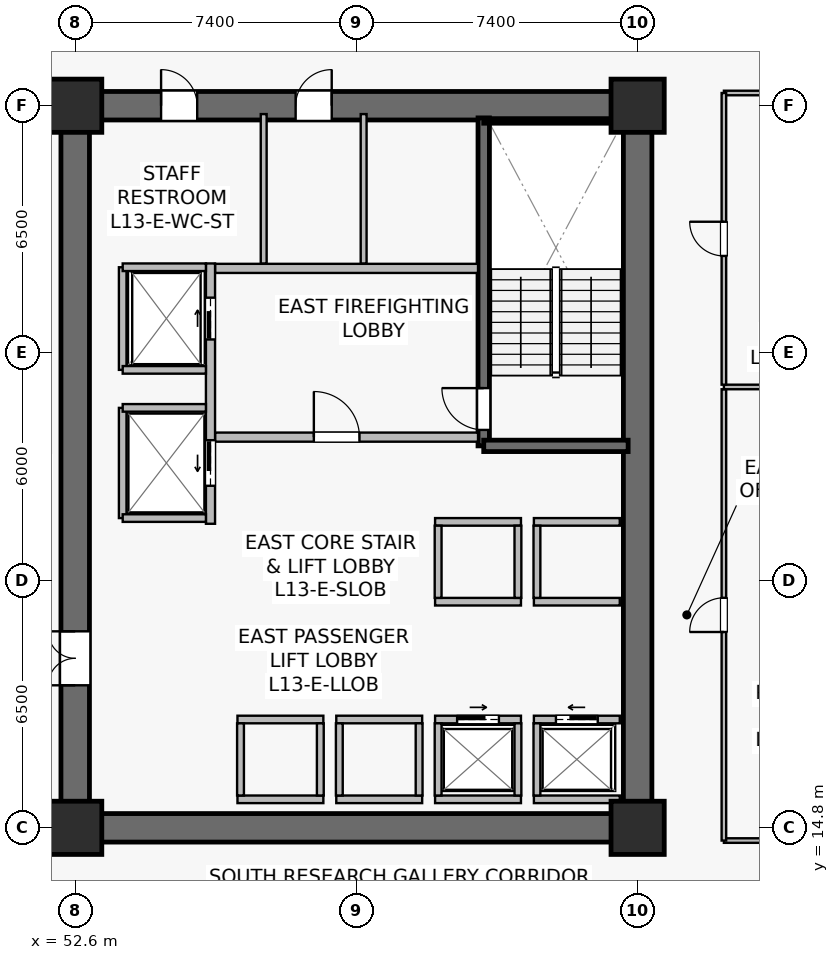
"""IFC4 building model, lengths in metres.
Left out: names, types, materials, properties, quantities, classifications, styles, units other than length and angle.
Written with IfcOpenShell. Run it as: python <this file> out.ifc"""

import sys

from ifc_helpers import new_model, si_unit, direction, frame, frame_2d, origin, origin_2d, place, context, subcontext, project, spatial, rectangle, extrude, source, transform, mapped, element, fill, save


model = new_model("IFC4")
c1 = context("Model", 3, precision=1e-05, world=origin(), true_north=direction((0.0, 1.0)))
c2 = subcontext(c1, "Body", "Model", "MODEL_VIEW")
j1 = project(units=[si_unit("LENGTHUNIT", "METRE"), si_unit("PLANEANGLEUNIT", "RADIAN")], contexts=[c1])
p1 = place(None, origin())
s1 = spatial("IfcSite", under=j1, at=p1, CompositionType="ELEMENT")
p2 = place(p1, origin())
s2 = spatial("IfcBuilding", under=s1, at=p2, CompositionType="ELEMENT")
p3 = place(p2, frame((0.0, 0.0, 53.9)))
s3 = spatial("IfcBuildingStorey", under=s2, at=p3, CompositionType="ELEMENT", Elevation=53.9)
p4 = place(p3, frame((52.225, 14.8, 0.0), z_axis=(0.0, 0.0, 1.0), x_axis=(1.0, 0.0, 0.0)))
e1 = element("IfcWall", 1, at=p4, inside=s3, PredefinedType="SHEAR", context=c2, shape_type="SweptSolid", body=[
    extrude(rectangle(XDim=15.55, YDim=0.75, at=frame_2d((7.775, 0.0))), origin(), (0.0, 0.0, 1.0), 3.78),
])
p5 = place(p3, frame((52.225, 33.8, 0.0), z_axis=(0.0, 0.0, 1.0), x_axis=(1.0, 0.0, 0.0)))
e2 = element("IfcWall", 2, at=p5, inside=s3, PredefinedType="SHEAR", context=c2, shape_type="SweptSolid", body=[
    extrude(rectangle(XDim=15.55, YDim=0.75, at=frame_2d((7.775, 0.0))), origin(), (0.0, 0.0, 1.0), 3.78),
])
p6 = place(p5, frame((6.175, 0.0, 0.0)))
e3 = element("IfcOpeningElement", 3, at=p6, cuts=e2, PredefinedType="OPENING", context=c2, shape_type="SweptSolid", body=[
    extrude(rectangle(XDim=0.95, YDim=2.15, at=frame_2d((0.475, 1.075))), frame((0.0, 0.385, 0.0), z_axis=(0.0, -1.0, 0.0), x_axis=(1.0, 0.0, 0.0)), (0.0, 0.0, 1.0), 0.77),
])
p7 = place(p5, frame((2.635, 0.0, 0.0)))
e4 = element("IfcOpeningElement", 4, at=p7, cuts=e2, PredefinedType="OPENING", context=c2, shape_type="SweptSolid", body=[
    extrude(rectangle(XDim=0.95, YDim=2.15, at=frame_2d((0.475, 1.075))), frame((0.0, 0.385, 0.0), z_axis=(0.0, -1.0, 0.0), x_axis=(1.0, 0.0, 0.0)), (0.0, 0.0, 1.0), 0.77),
])
p8 = place(p3, frame((52.6, 15.175, 0.0), z_axis=(0.0, 0.0, 1.0), x_axis=(0.0, 1.0, 0.0)))
e5 = element("IfcWall", 5, at=p8, inside=s3, PredefinedType="SHEAR", context=c2, shape_type="SweptSolid", body=[
    extrude(rectangle(XDim=18.25, YDim=0.75, at=frame_2d((9.125, 0.0))), origin(), (0.0, 0.0, 1.0), 3.78),
])
p9 = place(p8, frame((3.375, 0.0, 0.0)))
e6 = element("IfcOpeningElement", 6, at=p9, cuts=e5, PredefinedType="OPENING", context=c2, shape_type="SweptSolid", body=[
    extrude(rectangle(XDim=1.42, YDim=2.2, at=frame_2d((0.71, 1.1))), frame((0.0, 0.385, 0.0), z_axis=(0.0, -1.0, 0.0), x_axis=(1.0, 0.0, 0.0)), (0.0, 0.0, 1.0), 0.77),
])
p10 = place(p3, frame((67.4, 15.175, 0.0), z_axis=(0.0, 0.0, 1.0), x_axis=(0.0, 1.0, 0.0)))
e7 = element("IfcWall", 7, at=p10, inside=s3, PredefinedType="SHEAR", context=c2, shape_type="SweptSolid", body=[
    extrude(rectangle(XDim=18.25, YDim=0.75, at=frame_2d((9.125, 0.0))), origin(), (0.0, 0.0, 1.0), 3.78),
])
p11 = place(p3, frame((63.35, 24.85, 0.0), z_axis=(0.0, 0.0, 1.0), x_axis=(0.0, 1.0, 0.0)))
e8 = element("IfcWall", 8, at=p11, inside=s3, PredefinedType="SHEAR", context=c2, shape_type="SweptSolid", body=[
    extrude(rectangle(XDim=8.63, YDim=0.3, at=frame_2d((4.315, 0.0))), origin(), (0.0, 0.0, 1.0), 3.78),
])
p12 = place(p11, frame((0.42, 0.0, 0.0)))
e9 = element("IfcOpeningElement", 9, at=p12, cuts=e8, PredefinedType="OPENING", context=c2, shape_type="SweptSolid", body=[
    extrude(rectangle(XDim=1.1, YDim=2.15, at=frame_2d((0.55, 1.075))), frame((0.0, 0.16, 0.0), z_axis=(0.0, -1.0, 0.0), x_axis=(1.0, 0.0, 0.0)), (0.0, 0.0, 1.0), 0.32),
])
p13 = place(p3, frame((63.35, 24.85, 0.0), z_axis=(0.0, 0.0, 1.0), x_axis=(1.0, 0.0, 0.0)))
e10 = element("IfcWall", 10, at=p13, inside=s3, PredefinedType="SHEAR", context=c2, shape_type="SweptSolid", body=[
    extrude(rectangle(XDim=3.8, YDim=0.3, at=frame_2d((1.9, 0.0))), origin(), (0.0, 0.0, 1.0), 3.78),
])
p14 = place(p3, frame((63.35, 33.4, 0.0), z_axis=(0.0, 0.0, 1.0), x_axis=(1.0, 0.0, 0.0)))
e11 = element("IfcWall", 11, at=p14, inside=s3, PredefinedType="SOLIDWALL", context=c2, shape_type="SweptSolid", body=[
    extrude(rectangle(XDim=3.72, YDim=0.12, at=frame_2d((1.86, 0.0))), origin(), (0.0, 0.0, 1.0), 3.78),
])
m1 = source(origin(), c2, "Body", "SweptSolid", [
    extrude(rectangle(XDim=1.4, YDim=1.4, at=origin_2d()), origin(), (0.0, 0.0, 1.0), 4.1),
])
for number, where, z_axis, x_axis in (
    (12, (52.6, 14.8, 0.0), (0.0, 0.0, 1.0), (1.0, 0.0, 0.0)),
    (13, (67.4, 14.8, 0.0), (0.0, 0.0, 1.0), (1.0, 0.0, 0.0)),
    (14, (52.6, 33.8, 0.0), (0.0, 0.0, 1.0), (1.0, 0.0, 0.0)),
    (15, (67.4, 33.8, 0.0), (0.0, 0.0, 1.0), (1.0, 0.0, 0.0)),
):
    element("IfcColumn", number, at=place(p3, frame(where, z_axis=z_axis, x_axis=x_axis)), inside=s3, PredefinedType="COLUMN", context=c2, shape_type="MappedRepresentation", body=[
        mapped(m1, transform((0.0, 0.0, 0.0), scale=1.0)),
    ])
p15 = place(p3, frame((56.28, 25.08, 0.0), z_axis=(0.0, 0.0, 1.0), x_axis=(1.0, 0.0, 0.0)))
e16 = element("IfcWall", 16, at=p15, inside=s3, PredefinedType="SOLIDWALL", context=c2, shape_type="SweptSolid", body=[
    extrude(rectangle(XDim=6.92, YDim=0.24, at=frame_2d((3.46, 0.0))), origin(), (0.0, 0.0, 1.0), 3.065),
])
p16 = place(p15, frame((2.6, 0.0, 0.0)))
e17 = element("IfcOpeningElement", 17, at=p16, cuts=e16, PredefinedType="OPENING", context=c2, shape_type="SweptSolid", body=[
    extrude(rectangle(XDim=1.2, YDim=2.16, at=frame_2d((0.6, 1.08))), frame((0.0, 0.13, 0.0), z_axis=(0.0, -1.0, 0.0), x_axis=(1.0, 0.0, 0.0)), (0.0, 0.0, 1.0), 0.26),
])
p17 = place(p3, frame((56.28, 29.52, 0.0), z_axis=(0.0, 0.0, 1.0), x_axis=(1.0, 0.0, 0.0)))
e18 = element("IfcWall", 18, at=p17, inside=s3, PredefinedType="SOLIDWALL", context=c2, shape_type="SweptSolid", body=[
    extrude(rectangle(XDim=6.92, YDim=0.24, at=frame_2d((3.46, 0.0))), origin(), (0.0, 0.0, 1.0), 3.065),
])
p18 = place(p3, frame((56.16, 22.8, 0.0), z_axis=(0.0, 0.0, 1.0), x_axis=(0.0, 1.0, 0.0)))
e19 = element("IfcWall", 19, at=p18, inside=s3, PredefinedType="SOLIDWALL", context=c2, shape_type="SweptSolid", body=[
    extrude(rectangle(XDim=6.85, YDim=0.24, at=frame_2d((3.425, 0.0))), origin(), (0.0, 0.0, 1.0), 2.865),
])
p19 = place(p18, frame((4.85, 0.0, 0.0)))
e20 = element("IfcOpeningElement", 20, at=p19, cuts=e19, PredefinedType="OPENING", context=c2, shape_type="SweptSolid", body=[
    extrude(rectangle(XDim=1.1, YDim=2.22, at=frame_2d((0.55, 1.11))), frame((0.0, 0.13, 0.0), z_axis=(0.0, -1.0, 0.0), x_axis=(1.0, 0.0, 0.0)), (0.0, 0.0, 1.0), 0.26),
])
p20 = place(p18, frame((1.0, 0.0, 0.0)))
e21 = element("IfcOpeningElement", 21, at=p20, cuts=e19, PredefinedType="OPENING", context=c2, shape_type="SweptSolid", body=[
    extrude(rectangle(XDim=1.2, YDim=2.22, at=frame_2d((0.6, 1.11))), frame((0.0, 0.13, 0.0), z_axis=(0.0, -1.0, 0.0), x_axis=(1.0, 0.0, 0.0)), (0.0, 0.0, 1.0), 0.26),
])
p21 = place(p3, frame((64.67, 17.65, 0.0), z_axis=(0.0, 0.0, 1.0), x_axis=(1.0, 0.0, 0.0)))
e22 = element("IfcWall", 22, at=p21, inside=s3, PredefinedType="SOLIDWALL", context=c2, shape_type="SweptSolid", body=[
    extrude(rectangle(XDim=2.26, YDim=0.2, at=frame_2d((1.13, 0.0))), origin(), (0.0, 0.0, 1.0), 3.78),
])
p22 = place(p21, frame((0.58, 0.0, 0.0)))
e23 = element("IfcOpeningElement", 23, at=p22, cuts=e22, PredefinedType="OPENING", context=c2, shape_type="SweptSolid", body=[
    extrude(rectangle(XDim=1.1, YDim=2.22, at=frame_2d((0.55, 1.11))), frame((0.0, 0.11, 0.0), z_axis=(0.0, -1.0, 0.0), x_axis=(1.0, 0.0, 0.0)), (0.0, 0.0, 1.0), 0.22),
])
p23 = place(p3, frame((64.67, 15.55, 0.0), z_axis=(0.0, 0.0, 1.0), x_axis=(1.0, 0.0, 0.0)))
e24 = element("IfcWall", 24, at=p23, inside=s3, PredefinedType="SOLIDWALL", context=c2, shape_type="SweptSolid", body=[
    extrude(rectangle(XDim=2.26, YDim=0.2, at=frame_2d((1.13, 0.0))), origin(), (0.0, 0.0, 1.0), 3.78),
])
p24 = place(p3, frame((64.75, 15.65, 0.0), z_axis=(0.0, 0.0, 1.0), x_axis=(0.0, 1.0, 0.0)))
e25 = element("IfcWall", 25, at=p24, inside=s3, PredefinedType="SOLIDWALL", context=c2, shape_type="SweptSolid", body=[
    extrude(rectangle(XDim=1.9, YDim=0.18, at=frame_2d((0.95, 0.0))), origin(), (0.0, 0.0, 1.0), 3.78),
])
p25 = place(p3, frame((62.07, 17.65, 0.0), z_axis=(0.0, 0.0, 1.0), x_axis=(1.0, 0.0, 0.0)))
e26 = element("IfcWall", 26, at=p25, inside=s3, PredefinedType="SOLIDWALL", context=c2, shape_type="SweptSolid", body=[
    extrude(rectangle(XDim=2.26, YDim=0.2, at=frame_2d((1.13, 0.0))), origin(), (0.0, 0.0, 1.0), 3.78),
])
p26 = place(p25, frame((0.58, 0.0, 0.0)))
e27 = element("IfcOpeningElement", 27, at=p26, cuts=e26, PredefinedType="OPENING", context=c2, shape_type="SweptSolid", body=[
    extrude(rectangle(XDim=1.1, YDim=2.22, at=frame_2d((0.55, 1.11))), frame((0.0, 0.11, 0.0), z_axis=(0.0, -1.0, 0.0), x_axis=(1.0, 0.0, 0.0)), (0.0, 0.0, 1.0), 0.22),
])
p27 = place(p3, frame((62.07, 15.55, 0.0), z_axis=(0.0, 0.0, 1.0), x_axis=(1.0, 0.0, 0.0)))
e28 = element("IfcWall", 28, at=p27, inside=s3, PredefinedType="SOLIDWALL", context=c2, shape_type="SweptSolid", body=[
    extrude(rectangle(XDim=2.26, YDim=0.2, at=frame_2d((1.13, 0.0))), origin(), (0.0, 0.0, 1.0), 3.78),
])
for number, where, z_axis, x_axis in (
    (29, (62.15, 15.65, 0.0), (0.0, 0.0, 1.0), (0.0, 1.0, 0.0)),
    (30, (64.25, 15.65, 0.0), (0.0, 0.0, 1.0), (0.0, 1.0, 0.0)),
):
    element("IfcWall", number, at=place(p3, frame(where, z_axis=z_axis, x_axis=x_axis)), inside=s3, PredefinedType="SOLIDWALL", context=c2, shape_type="SweptSolid", body=[
        extrude(rectangle(XDim=1.9, YDim=0.18, at=frame_2d((0.95, 0.0))), origin(), (0.0, 0.0, 1.0), 3.78),
    ])
for number, where, z_axis, x_axis in (
    (31, (59.47, 17.65, 0.0), (0.0, 0.0, 1.0), (1.0, 0.0, 0.0)),
    (32, (59.47, 15.55, 0.0), (0.0, 0.0, 1.0), (1.0, 0.0, 0.0)),
):
    element("IfcWall", number, at=place(p3, frame(where, z_axis=z_axis, x_axis=x_axis)), inside=s3, PredefinedType="SOLIDWALL", context=c2, shape_type="SweptSolid", body=[
        extrude(rectangle(XDim=2.26, YDim=0.2, at=frame_2d((1.13, 0.0))), origin(), (0.0, 0.0, 1.0), 3.065),
    ])
for number, where, z_axis, x_axis in (
    (33, (59.55, 15.65, 0.0), (0.0, 0.0, 1.0), (0.0, 1.0, 0.0)),
    (34, (61.65, 15.65, 0.0), (0.0, 0.0, 1.0), (0.0, 1.0, 0.0)),
):
    element("IfcWall", number, at=place(p3, frame(where, z_axis=z_axis, x_axis=x_axis)), inside=s3, PredefinedType="SOLIDWALL", context=c2, shape_type="SweptSolid", body=[
        extrude(rectangle(XDim=1.9, YDim=0.18, at=frame_2d((0.95, 0.0))), origin(), (0.0, 0.0, 1.0), 3.78),
    ])
for number, where, z_axis, x_axis in (
    (35, (56.87, 17.65, 0.0), (0.0, 0.0, 1.0), (1.0, 0.0, 0.0)),
    (36, (56.87, 15.55, 0.0), (0.0, 0.0, 1.0), (1.0, 0.0, 0.0)),
):
    element("IfcWall", number, at=place(p3, frame(where, z_axis=z_axis, x_axis=x_axis)), inside=s3, PredefinedType="SOLIDWALL", context=c2, shape_type="SweptSolid", body=[
        extrude(rectangle(XDim=2.26, YDim=0.2, at=frame_2d((1.13, 0.0))), origin(), (0.0, 0.0, 1.0), 3.78),
    ])
for number, where, z_axis, x_axis in (
    (37, (56.95, 15.65, 0.0), (0.0, 0.0, 1.0), (0.0, 1.0, 0.0)),
    (38, (59.05, 15.65, 0.0), (0.0, 0.0, 1.0), (0.0, 1.0, 0.0)),
):
    element("IfcWall", number, at=place(p3, frame(where, z_axis=z_axis, x_axis=x_axis)), inside=s3, PredefinedType="SOLIDWALL", context=c2, shape_type="SweptSolid", body=[
        extrude(rectangle(XDim=1.9, YDim=0.18, at=frame_2d((0.95, 0.0))), origin(), (0.0, 0.0, 1.0), 3.78),
    ])
for number, where, z_axis, x_axis in (
    (39, (64.67, 20.75, 0.0), (0.0, 0.0, 1.0), (1.0, 0.0, 0.0)),
    (40, (64.67, 22.85, 0.0), (0.0, 0.0, 1.0), (1.0, 0.0, 0.0)),
):
    element("IfcWall", number, at=place(p3, frame(where, z_axis=z_axis, x_axis=x_axis)), inside=s3, PredefinedType="SOLIDWALL", context=c2, shape_type="SweptSolid", body=[
        extrude(rectangle(XDim=2.26, YDim=0.2, at=frame_2d((1.13, 0.0))), origin(), (0.0, 0.0, 1.0), 3.78),
    ])
p28 = place(p3, frame((64.75, 20.85, 0.0), z_axis=(0.0, 0.0, 1.0), x_axis=(0.0, 1.0, 0.0)))
e41 = element("IfcWall", 41, at=p28, inside=s3, PredefinedType="SOLIDWALL", context=c2, shape_type="SweptSolid", body=[
    extrude(rectangle(XDim=1.9, YDim=0.18, at=frame_2d((0.95, 0.0))), origin(), (0.0, 0.0, 1.0), 3.78),
])
for number, where, z_axis, x_axis in (
    (42, (62.07, 20.75, 0.0), (0.0, 0.0, 1.0), (1.0, 0.0, 0.0)),
    (43, (62.07, 22.85, 0.0), (0.0, 0.0, 1.0), (1.0, 0.0, 0.0)),
):
    element("IfcWall", number, at=place(p3, frame(where, z_axis=z_axis, x_axis=x_axis)), inside=s3, PredefinedType="SOLIDWALL", context=c2, shape_type="SweptSolid", body=[
        extrude(rectangle(XDim=2.26, YDim=0.2, at=frame_2d((1.13, 0.0))), origin(), (0.0, 0.0, 1.0), 3.78),
    ])
for number, where, z_axis, x_axis in (
    (44, (62.15, 20.85, 0.0), (0.0, 0.0, 1.0), (0.0, 1.0, 0.0)),
    (45, (64.25, 20.85, 0.0), (0.0, 0.0, 1.0), (0.0, 1.0, 0.0)),
):
    element("IfcWall", number, at=place(p3, frame(where, z_axis=z_axis, x_axis=x_axis)), inside=s3, PredefinedType="SOLIDWALL", context=c2, shape_type="SweptSolid", body=[
        extrude(rectangle(XDim=1.9, YDim=0.18, at=frame_2d((0.95, 0.0))), origin(), (0.0, 0.0, 1.0), 3.78),
    ])
p29 = place(p3, frame((53.85, 26.85, 0.0), z_axis=(0.0, 0.0, 1.0), x_axis=(0.0, 1.0, 0.0)))
e46 = element("IfcWall", 46, at=p29, inside=s3, PredefinedType="SOLIDWALL", context=c2, shape_type="SweptSolid", body=[
    extrude(rectangle(XDim=2.7, YDim=0.2, at=frame_2d((1.35, 0.0))), origin(), (0.0, 0.0, 1.0), 3.78),
])
p30 = place(p3, frame((53.85, 29.55, 0.0), z_axis=(0.0, 0.0, 1.0), x_axis=(1.0, 0.0, 0.0)))
e47 = element("IfcWall", 47, at=p30, inside=s3, PredefinedType="SOLIDWALL", context=c2, shape_type="SweptSolid", body=[
    extrude(rectangle(XDim=2.19, YDim=0.2, at=frame_2d((1.095, 0.0))), origin(), (0.0, 0.0, 1.0), 3.78),
])
p31 = place(p3, frame((53.85, 26.85, 0.0), z_axis=(0.0, 0.0, 1.0), x_axis=(1.0, 0.0, 0.0)))
e48 = element("IfcWall", 48, at=p31, inside=s3, PredefinedType="SOLIDWALL", context=c2, shape_type="SweptSolid", body=[
    extrude(rectangle(XDim=2.19, YDim=0.2, at=frame_2d((1.095, 0.0))), origin(), (0.0, 0.0, 1.0), 3.177),
])
p32 = place(p3, frame((53.85, 22.95, 0.0), z_axis=(0.0, 0.0, 1.0), x_axis=(0.0, 1.0, 0.0)))
e49 = element("IfcWall", 49, at=p32, inside=s3, PredefinedType="SOLIDWALL", context=c2, shape_type="SweptSolid", body=[
    extrude(rectangle(XDim=2.9, YDim=0.2, at=frame_2d((1.45, 0.0))), origin(), (0.0, 0.0, 1.0), 2.865),
])
for number, where, z_axis, x_axis in (
    (50, (53.85, 25.85, 0.0), (0.0, 0.0, 1.0), (1.0, 0.0, 0.0)),
    (51, (53.85, 22.95, 0.0), (0.0, 0.0, 1.0), (1.0, 0.0, 0.0)),
):
    element("IfcWall", number, at=place(p3, frame(where, z_axis=z_axis, x_axis=x_axis)), inside=s3, PredefinedType="SOLIDWALL", context=c2, shape_type="SweptSolid", body=[
        extrude(rectangle(XDim=2.19, YDim=0.2, at=frame_2d((1.095, 0.0))), origin(), (0.0, 0.0, 1.0), 3.78),
    ])
p33 = place(p3, frame((60.19, 29.65, 0.0), z_axis=(0.0, 0.0, 1.0), x_axis=(0.0, 1.0, 0.0)))
e52 = element("IfcWall", 52, at=p33, inside=s3, PredefinedType="PLUMBINGWALL", context=c2, shape_type="SweptSolid", body=[
    extrude(rectangle(XDim=3.93, YDim=0.155, at=frame_2d((1.965, 0.0))), origin(), (0.0, 0.0, 1.0), 3.065),
])
p34 = place(p3, frame((57.56, 29.65, 0.0), z_axis=(0.0, 0.0, 1.0), x_axis=(0.0, 1.0, 0.0)))
e53 = element("IfcWall", 53, at=p34, inside=s3, PredefinedType="PLUMBINGWALL", context=c2, shape_type="SweptSolid", body=[
    extrude(rectangle(XDim=3.93, YDim=0.155, at=frame_2d((1.965, 0.0))), origin(), (0.0, 0.0, 1.0), 3.78),
])
for number, where, z_axis, x_axis in (
    (54, (69.67, 14.465, 0.0), (0.0, 0.0, 1.0), (1.0, 0.0, 0.0)),
    (55, (69.67, 34.135, 0.0), (0.0, 0.0, 1.0), (1.0, 0.0, 0.0)),
):
    element("IfcWall", number, at=place(p3, frame(where, z_axis=z_axis, x_axis=x_axis)), inside=s3, PredefinedType="PARTITIONING", context=c2, shape_type="SweptSolid", body=[
        extrude(rectangle(XDim=5.02, YDim=0.12, at=frame_2d((2.51, 0.0))), origin(), (0.0, 0.0, 1.0), 3.78),
    ])
p35 = place(p3, frame((69.67, 14.465, 0.0), z_axis=(0.0, 0.0, 1.0), x_axis=(0.0, 1.0, 0.0)))
e56 = element("IfcWall", 56, at=p35, inside=s3, PredefinedType="PARTITIONING", context=c2, shape_type="SweptSolid", body=[
    extrude(rectangle(XDim=11.875, YDim=0.12, at=frame_2d((5.938, 0.0))), origin(), (0.0, 0.0, 1.0), 3.78),
])
p36 = place(p35, frame((5.488, 0.0, 0.0)))
e57 = element("IfcOpeningElement", 57, at=p36, cuts=e56, PredefinedType="OPENING", context=c2, shape_type="SweptSolid", body=[
    extrude(rectangle(XDim=0.9, YDim=2.1, at=frame_2d((0.45, 1.05))), frame((0.0, 0.07, 0.0), z_axis=(0.0, -1.0, 0.0), x_axis=(1.0, 0.0, 0.0)), (0.0, 0.0, 1.0), 0.14),
])
p37 = place(p3, frame((69.67, 26.4, 0.0), z_axis=(0.0, 0.0, 1.0), x_axis=(1.0, 0.0, 0.0)))
e58 = element("IfcWall", 58, at=p37, inside=s3, PredefinedType="PARTITIONING", context=c2, shape_type="SweptSolid", body=[
    extrude(rectangle(XDim=5.02, YDim=0.12, at=frame_2d((2.51, 0.0))), origin(), (0.0, 0.0, 1.0), 3.78),
])
p38 = place(p3, frame((69.67, 26.46, 0.0), z_axis=(0.0, 0.0, 1.0), x_axis=(0.0, 1.0, 0.0)))
e59 = element("IfcWall", 59, at=p38, inside=s3, PredefinedType="PARTITIONING", context=c2, shape_type="SweptSolid", body=[
    extrude(rectangle(XDim=7.675, YDim=0.12, at=frame_2d((3.837, 0.0))), origin(), (0.0, 0.0, 1.0), 3.78),
])
p39 = place(p38, frame((3.387, 0.0, 0.0)))
e60 = element("IfcOpeningElement", 60, at=p39, cuts=e59, PredefinedType="OPENING", context=c2, shape_type="SweptSolid", body=[
    extrude(rectangle(XDim=0.9, YDim=2.1, at=frame_2d((0.45, 1.05))), frame((0.0, 0.07, 0.0), z_axis=(0.0, -1.0, 0.0), x_axis=(1.0, 0.0, 0.0)), (0.0, 0.0, 1.0), 0.14),
])
m2 = source(origin(), c2, "Body", "SweptSolid", [
    extrude(rectangle(XDim=1.1, YDim=2.15, at=frame_2d((0.55, 1.075))), frame((0.0, 0.025, 0.0), z_axis=(0.0, -1.0, 0.0), x_axis=(1.0, 0.0, 0.0)), (0.0, 0.0, 1.0), 0.05),
])
p40 = place(p12, origin())
e61 = element("IfcDoor", 61, at=p40, inside=s3, OperationType="SINGLE_SWING_RIGHT", PredefinedType="DOOR", context=c2, shape_type="MappedRepresentation", body=[
    mapped(m2, transform((0.0, 0.0, 0.0), scale=1.0)),
])
fill(e9, e61)
m3 = source(origin(), c2, "Body", "SweptSolid", [
    extrude(rectangle(XDim=1.2, YDim=2.16, at=frame_2d((0.6, 1.08))), frame((0.0, 0.025, 0.0), z_axis=(0.0, -1.0, 0.0), x_axis=(1.0, 0.0, 0.0)), (0.0, 0.0, 1.0), 0.05),
])
p41 = place(p16, origin())
e62 = element("IfcDoor", 62, at=p41, inside=s3, OperationType="SINGLE_SWING_LEFT", PredefinedType="DOOR", context=c2, shape_type="MappedRepresentation", body=[
    mapped(m3, transform((0.0, 0.0, 0.0), scale=1.0)),
])
fill(e17, e62)
m4 = source(origin(), c2, "Body", "SweptSolid", [
    extrude(rectangle(XDim=1.1, YDim=2.22, at=frame_2d((0.55, 1.11))), frame((0.0, 0.025, 0.0), z_axis=(0.0, -1.0, 0.0), x_axis=(1.0, 0.0, 0.0)), (0.0, 0.0, 1.0), 0.05),
])
p42 = place(p22, origin())
e63 = element("IfcDoor", 63, at=p42, inside=s3, OperationType="SLIDING_TO_LEFT", PredefinedType="USERDEFINED", context=c2, shape_type="MappedRepresentation", body=[
    mapped(m4, transform((0.0, 0.0, 0.0), scale=1.0)),
])
fill(e23, e63)
p43 = place(p26, origin())
e64 = element("IfcDoor", 64, at=p43, inside=s3, OperationType="SLIDING_TO_RIGHT", PredefinedType="USERDEFINED", context=c2, shape_type="MappedRepresentation", body=[
    mapped(m4, transform((0.0, 0.0, 0.0), scale=1.0)),
])
fill(e27, e64)
p44 = place(p19, origin())
e65 = element("IfcDoor", 65, at=p44, inside=s3, OperationType="SLIDING_TO_RIGHT", PredefinedType="USERDEFINED", context=c2, shape_type="MappedRepresentation", body=[
    mapped(m4, transform((0.0, 0.0, 0.0), scale=1.0)),
])
fill(e20, e65)
m5 = source(origin(), c2, "Body", "SweptSolid", [
    extrude(rectangle(XDim=1.2, YDim=2.22, at=frame_2d((0.6, 1.11))), frame((0.0, 0.025, 0.0), z_axis=(0.0, -1.0, 0.0), x_axis=(1.0, 0.0, 0.0)), (0.0, 0.0, 1.0), 0.05),
])
p45 = place(p20, origin())
e66 = element("IfcDoor", 66, at=p45, inside=s3, OperationType="SLIDING_TO_LEFT", PredefinedType="USERDEFINED", context=c2, shape_type="MappedRepresentation", body=[
    mapped(m5, transform((0.0, 0.0, 0.0), scale=1.0)),
])
fill(e21, e66)
m6 = source(origin(), c2, "Body", "SweptSolid", [
    extrude(rectangle(XDim=1.42, YDim=2.2, at=frame_2d((0.71, 1.1))), frame((0.0, 0.025, 0.0), z_axis=(0.0, -1.0, 0.0), x_axis=(1.0, 0.0, 0.0)), (0.0, 0.0, 1.0), 0.05),
])
p46 = place(p9, origin())
e67 = element("IfcDoor", 67, at=p46, inside=s3, OperationType="DOUBLE_DOOR_SINGLE_SWING", PredefinedType="DOOR", context=c2, shape_type="MappedRepresentation", body=[
    mapped(m6, transform((0.0, 0.0, 0.0), scale=1.0)),
])
fill(e6, e67)
m7 = source(origin(), c2, "Body", "SweptSolid", [
    extrude(rectangle(XDim=0.95, YDim=2.15, at=frame_2d((0.475, 1.075))), frame((0.0, 0.025, 0.0), z_axis=(0.0, -1.0, 0.0), x_axis=(1.0, 0.0, 0.0)), (0.0, 0.0, 1.0), 0.05),
])
p47 = place(p6, origin())
e68 = element("IfcDoor", 68, at=p47, inside=s3, OperationType="SINGLE_SWING_RIGHT", PredefinedType="DOOR", context=c2, shape_type="MappedRepresentation", body=[
    mapped(m7, transform((0.0, 0.0, 0.0), scale=1.0)),
])
fill(e3, e68)
p48 = place(p7, origin())
e69 = element("IfcDoor", 69, at=p48, inside=s3, OperationType="SINGLE_SWING_LEFT", PredefinedType="DOOR", context=c2, shape_type="MappedRepresentation", body=[
    mapped(m7, transform((0.0, 0.0, 0.0), scale=1.0)),
])
fill(e4, e69)
m8 = source(origin(), c2, "Body", "SweptSolid", [
    extrude(rectangle(XDim=0.9, YDim=2.1, at=frame_2d((0.45, 1.05))), frame((0.0, 0.025, 0.0), z_axis=(0.0, -1.0, 0.0), x_axis=(1.0, 0.0, 0.0)), (0.0, 0.0, 1.0), 0.05),
])
p49 = place(p36, origin())
e70 = element("IfcDoor", 70, at=p49, inside=s3, OperationType="SINGLE_SWING_LEFT", PredefinedType="DOOR", context=c2, shape_type="MappedRepresentation", body=[
    mapped(m8, transform((0.0, 0.0, 0.0), scale=1.0)),
])
fill(e57, e70)
p50 = place(p39, origin())
e71 = element("IfcDoor", 71, at=p50, inside=s3, OperationType="SINGLE_SWING_RIGHT", PredefinedType="DOOR", context=c2, shape_type="MappedRepresentation", body=[
    mapped(m8, transform((0.0, 0.0, 0.0), scale=1.0)),
])
fill(e60, e71)
save(model, sys.argv[1])
